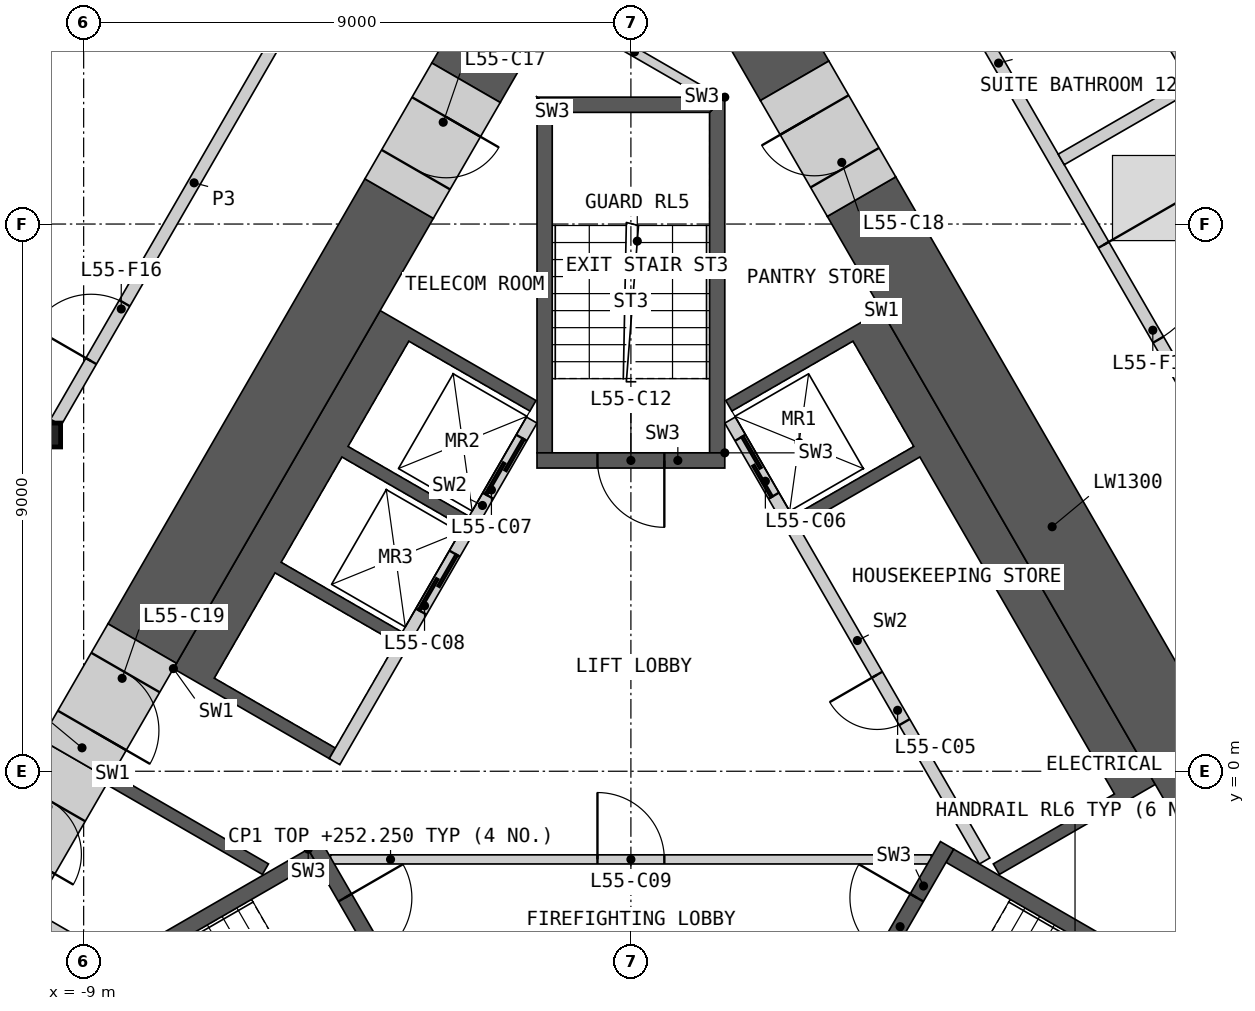
"""IFC4 building model, lengths in metres.
Left out: names, types, materials, properties, quantities, classifications, styles, units other than length and angle.
Written with IfcOpenShell. Run it as: python <this file> out.ifc"""

import sys

from ifc_helpers import new_model, si_unit, direction, frame, frame_2d, origin, origin_2d, place, context, subcontext, project, spatial, polyline, rectangle, i_section, outline, extrude, element, fill, save


model = new_model("IFC4")
c1 = context("Model", 3, precision=1e-05, world=origin(), true_north=direction((0.0, 1.0)))
c2 = subcontext(c1, "Body", "Model", "MODEL_VIEW")
j1 = project(units=[si_unit("LENGTHUNIT", "METRE"), si_unit("PLANEANGLEUNIT", "RADIAN")], contexts=[c1])
p1 = place(None, origin())
s1 = spatial("IfcSite", under=j1, at=p1, CompositionType="ELEMENT")
p2 = place(p1, origin())
s2 = spatial("IfcBuilding", under=s1, at=p2, CompositionType="ELEMENT")
p3 = place(p2, frame((0.0, 0.0, 249.0)))
s3 = spatial("IfcBuildingStorey", under=s2, at=p3, CompositionType="ELEMENT", Elevation=249.0)
p4 = place(p3, frame((-9.578, 5.53, 0.0), z_axis=(0.0, 0.0, 1.0), x_axis=(1.0, 0.0, 0.0)))
e1 = element("IfcColumn", 1, at=p4, inside=s3, PredefinedType="COLUMN", context=c2, shape_type="SweptSolid", body=[
    extrude(i_section(OverallWidth=0.399, OverallDepth=0.393, WebThickness=0.023, FlangeThickness=0.037, at=origin_2d()), origin(), (0.0, 0.0, 1.0), 3.6),
])
p5 = place(p3, origin())
e2 = element("IfcWall", 2, at=p5, inside=s3, PredefinedType="SHEAR", context=c2, shape_type="SweptSolid", body=[
    extrude(outline(polyline([(4.124, 7.577), (8.624, -0.217), (8.231, -0.444), (6.061, -1.697), (5.96, -1.524), (7.952, -0.374), (4.752, 5.169), (2.76, 4.019), (2.66, 4.192), (4.652, 5.342), (3.652, 7.074), (1.66, 5.924), (1.561, 6.097), (3.731, 7.35), (4.124, 7.577)])), origin(), (0.0, 0.0, 1.0), 3.25),
])
p6 = place(p3, frame((5.817, -1.476, 0.0), z_axis=(0.0, 0.0, 1.0), x_axis=(-0.500002616675, 0.866023893041, 0.0)))
e3 = element("IfcWall", 3, at=p6, inside=s3, PredefinedType="SOLIDWALL", context=c2, shape_type="SweptSolid", body=[
    extrude(rectangle(XDim=8.373, YDim=0.2, at=frame_2d((4.187, 0.0))), origin(), (0.0, 0.0, 1.0), 3.25),
])
p7 = place(p6, frame((2.637, 0.0, 0.0)))
e4 = element("IfcOpeningElement", 4, at=p7, cuts=e3, PredefinedType="OPENING", context=c2, shape_type="SweptSolid", body=[
    extrude(rectangle(XDim=0.9, YDim=2.1, at=frame_2d((0.45, 1.05))), frame((0.0, 0.11, 0.0), z_axis=(0.0, -1.0, 0.0), x_axis=(1.0, 0.0, 0.0)), (0.0, 0.0, 1.0), 0.22),
])
p8 = place(p6, frame((6.937, 0.0, 0.0)))
e5 = element("IfcOpeningElement", 5, at=p8, cuts=e3, PredefinedType="OPENING", context=c2, shape_type="SweptSolid", body=[
    extrude(rectangle(XDim=1.1, YDim=2.1, at=frame_2d((0.55, 1.05))), frame((0.0, 0.11, 0.0), z_axis=(0.0, -1.0, 0.0), x_axis=(1.0, 0.0, 0.0)), (0.0, 0.0, 1.0), 0.22),
])
p9 = place(p3, origin())
e6 = element("IfcWall", 6, at=p9, inside=s3, PredefinedType="SHEAR", context=c2, shape_type="SweptSolid", body=[
    extrude(outline(polyline([(-7.524, 1.688), (-4.124, 7.577), (-3.731, 7.35), (-1.561, 6.097), (-1.66, 5.924), (-3.652, 7.074), (-4.652, 5.342), (-2.66, 4.192), (-2.76, 4.019), (-4.752, 5.169), (-5.752, 3.437), (-3.76, 2.287), (-3.861, 2.113), (-5.852, 3.263), (-6.852, 1.531), (-4.861, 0.381), (-4.96, 0.208), (-7.131, 1.461), (-7.524, 1.688)])), origin(), (0.0, 0.0, 1.0), 3.25),
])
p10 = place(p3, origin())
e7 = element("IfcWall", 7, at=p10, inside=s3, PredefinedType="SHEAR", context=c2, shape_type="SweptSolid", body=[
    extrude(outline(polyline([(-8.524, -0.044), (-8.131, -0.271), (-5.96, -1.524), (-6.061, -1.697), (-8.231, -0.444), (-8.624, -0.217), (-8.524, -0.044)])), origin(), (0.0, 0.0, 1.0), 3.25),
])
p11 = place(p3, frame((-1.631, 5.776, 0.0), z_axis=(0.0, 0.0, 1.0), x_axis=(-0.499992876559, -0.866029516466, 0.0)))
e8 = element("IfcWall", 8, at=p11, inside=s3, PredefinedType="SOLIDWALL", context=c2, shape_type="SweptSolid", body=[
    extrude(rectangle(XDim=6.486, YDim=0.2, at=frame_2d((3.243, 0.0))), origin(), (0.0, 0.0, 1.0), 3.25),
])
p12 = place(p11, frame((0.337, 0.0, 0.0)))
e9 = element("IfcOpeningElement", 9, at=p12, cuts=e8, PredefinedType="OPENING", context=c2, shape_type="SweptSolid", body=[
    extrude(rectangle(XDim=1.1, YDim=2.1, at=frame_2d((0.55, 1.05))), frame((0.0, 0.11, 0.0), z_axis=(0.0, -1.0, 0.0), x_axis=(1.0, 0.0, 0.0)), (0.0, 0.0, 1.0), 0.22),
])
p13 = place(p11, frame((2.537, 0.0, 0.0)))
e10 = element("IfcOpeningElement", 10, at=p13, cuts=e8, PredefinedType="OPENING", context=c2, shape_type="SweptSolid", body=[
    extrude(rectangle(XDim=1.1, YDim=2.1, at=frame_2d((0.55, 1.05))), frame((0.0, 0.11, 0.0), z_axis=(0.0, -1.0, 0.0), x_axis=(1.0, 0.0, 0.0)), (0.0, 0.0, 1.0), 0.22),
])
p14 = place(p3, frame((-4.941, -1.45, 0.0), z_axis=(0.0, 0.0, 1.0), x_axis=(1.0, 0.0, 0.0)))
e11 = element("IfcWall", 11, at=p14, inside=s3, PredefinedType="PARTITIONING", context=c2, shape_type="SweptSolid", body=[
    extrude(rectangle(XDim=9.882, YDim=0.15, at=frame_2d((4.941, 0.0))), origin(), (0.0, 0.0, 1.0), 3.25),
])
p15 = place(p14, frame((4.391, 0.0, 0.0)))
e12 = element("IfcOpeningElement", 12, at=p15, cuts=e11, PredefinedType="OPENING", context=c2, shape_type="SweptSolid", body=[
    extrude(rectangle(XDim=1.1, YDim=2.1, at=frame_2d((0.55, 1.05))), frame((0.0, 0.085, 0.0), z_axis=(0.0, -1.0, 0.0), x_axis=(1.0, 0.0, 0.0)), (0.0, 0.0, 1.0), 0.17),
])
p16 = place(p3, origin())
e13 = element("IfcWall", 13, at=p16, inside=s3, PredefinedType="SHEAR", context=c2, shape_type="SweptSolid", body=[
    extrude(outline(polyline([(-5.307, -1.281), (-10.374, -4.206), (-10.032, -4.298), (-5.182, -1.498), (-5.307, -1.281)])), origin(), (0.0, 0.0, 1.0), 3.25),
])
p17 = place(p3, frame((-5.199, -1.219, 0.0), z_axis=(0.0, 0.0, 1.0), x_axis=(0.499982516597, -0.866035497597, 0.0)))
e14 = element("IfcWall", 14, at=p17, inside=s3, PredefinedType="SHEAR", context=c2, shape_type="SweptSolid", body=[
    extrude(rectangle(XDim=3.088, YDim=0.25, at=frame_2d((1.544, 0.0))), origin(), (0.0, 0.0, 1.0), 3.25),
])
p18 = place(p17, frame((0.994, 0.0, 0.0)))
e15 = element("IfcOpeningElement", 15, at=p18, cuts=e14, PredefinedType="OPENING", context=c2, shape_type="SweptSolid", body=[
    extrude(rectangle(XDim=1.1, YDim=2.1, at=frame_2d((0.55, 1.05))), frame((0.0, 0.135, 0.0), z_axis=(0.0, -1.0, 0.0), x_axis=(1.0, 0.0, 0.0)), (0.0, 0.0, 1.0), 0.27),
])
p19 = place(p3, origin())
e16 = element("IfcWall", 16, at=p19, inside=s3, PredefinedType="SHEAR", context=c2, shape_type="SweptSolid", body=[
    extrude(outline(polyline([(10.032, -4.298), (10.374, -4.206), (5.307, -1.281), (5.182, -1.498), (10.032, -4.298)])), origin(), (0.0, 0.0, 1.0), 3.25),
])
p20 = place(p3, frame((3.655, -3.893, 0.0), z_axis=(0.0, 0.0, 1.0), x_axis=(0.499982516597, 0.866035497597, 0.0)))
e17 = element("IfcWall", 17, at=p20, inside=s3, PredefinedType="SHEAR", context=c2, shape_type="SweptSolid", body=[
    extrude(rectangle(XDim=3.088, YDim=0.25, at=frame_2d((1.544, 0.0))), origin(), (0.0, 0.0, 1.0), 3.25),
])
p21 = place(p20, frame((0.994, 0.0, 0.0)))
e18 = element("IfcOpeningElement", 18, at=p21, cuts=e17, PredefinedType="OPENING", context=c2, shape_type="SweptSolid", body=[
    extrude(rectangle(XDim=1.1, YDim=2.1, at=frame_2d((0.55, 1.05))), frame((0.0, 0.135, 0.0), z_axis=(0.0, -1.0, 0.0), x_axis=(1.0, 0.0, 0.0)), (0.0, 0.0, 1.0), 0.27),
])
p22 = place(p3, origin())
e19 = element("IfcWall", 19, at=p22, inside=s3, PredefinedType="SHEAR", context=c2, shape_type="SweptSolid", body=[
    extrude(outline(polyline([(1.544, 5.237), (1.544, 11.087), (1.294, 10.837), (1.294, 5.237), (1.544, 5.237)])), origin(), (0.0, 0.0, 1.0), 3.25),
])
p23 = place(p3, origin())
e20 = element("IfcWall", 20, at=p23, inside=s3, PredefinedType="SHEAR", context=c2, shape_type="SweptSolid", body=[
    extrude(outline(polyline([(1.544, 11.087), (-1.544, 11.087), (-1.294, 10.837), (1.294, 10.837), (1.544, 11.087)])), origin(), (0.0, 0.0, 1.0), 3.25),
])
p24 = place(p3, origin())
e21 = element("IfcWall", 21, at=p24, inside=s3, PredefinedType="SHEAR", context=c2, shape_type="SweptSolid", body=[
    extrude(outline(polyline([(-1.294, 10.837), (-1.544, 11.087), (-1.544, 5.237), (-1.294, 5.237), (-1.294, 10.837)])), origin(), (0.0, 0.0, 1.0), 3.25),
])
p25 = place(p3, frame((1.544, 5.112, 0.0), z_axis=(0.0, 0.0, 1.0), x_axis=(-1.0, 0.0, 0.0)))
e22 = element("IfcWall", 22, at=p25, inside=s3, PredefinedType="SHEAR", context=c2, shape_type="SweptSolid", body=[
    extrude(rectangle(XDim=3.088, YDim=0.25, at=frame_2d((1.544, 0.0))), origin(), (0.0, 0.0, 1.0), 3.25),
])
p26 = place(p25, frame((0.994, 0.0, 0.0)))
e23 = element("IfcOpeningElement", 23, at=p26, cuts=e22, PredefinedType="OPENING", context=c2, shape_type="SweptSolid", body=[
    extrude(rectangle(XDim=1.1, YDim=2.1, at=frame_2d((0.55, 1.05))), frame((0.0, 0.135, 0.0), z_axis=(0.0, -1.0, 0.0), x_axis=(1.0, 0.0, 0.0)), (0.0, 0.0, 1.0), 0.27),
])
p27 = place(p3, frame((-1.237, 12.578, 0.0), z_axis=(0.0, 0.0, 1.0), x_axis=(0.866045649925, -0.499964931016, 0.0)))
e24 = element("IfcWall", 24, at=p27, inside=s3, PredefinedType="PARTITIONING", context=c2, shape_type="SweptSolid", body=[
    extrude(rectangle(XDim=2.992, YDim=0.15, at=frame_2d((1.496, 0.0))), origin(), (0.0, 0.0, 1.0), 3.25),
])
p28 = place(p3, frame((-9.862, -2.361, 0.0), z_axis=(0.0, 0.0, 1.0), x_axis=(0.865990094875, -0.500061151839, 0.0)))
e25 = element("IfcWall", 25, at=p28, inside=s3, PredefinedType="PARTITIONING", context=c2, shape_type="SweptSolid", body=[
    extrude(rectangle(XDim=1.56, YDim=0.15, at=frame_2d((0.78, 0.0))), origin(), (0.0, 0.0, 1.0), 3.25),
])
p29 = place(p3, frame((10.062, -1.408, 0.0), z_axis=(0.0, 0.0, 1.0), x_axis=(-0.500000545805, 0.866025088663, 0.0)))
e26 = element("IfcWall", 26, at=p29, inside=s3, PredefinedType="SHEAR", context=c2, shape_type="SweptSolid", body=[
    extrude(rectangle(XDim=12.539, YDim=1.3, at=frame_2d((6.27, 0.0))), origin(), (0.0, 0.0, 1.0), 3.25),
])
p30 = place(p3, frame((2.693, 11.356, 0.0), z_axis=(0.0, 0.0, 1.0), x_axis=(-0.50002837164, 0.866009022791, 0.0)))
e27 = element("IfcWall", 27, at=p30, inside=s3, PredefinedType="SHEAR", context=c2, shape_type="SweptSolid", body=[
    extrude(rectangle(XDim=4.26, YDim=1.3, at=frame_2d((2.13, 0.0))), origin(), (0.0, 0.0, 1.0), 3.25),
])
p31 = place(p3, frame((-3.812, 9.418, 0.0), z_axis=(0.0, 0.0, 1.0), x_axis=(-0.499995037753, -0.86602826872, 0.0)))
e28 = element("IfcWall", 28, at=p31, inside=s3, PredefinedType="SHEAR", context=c2, shape_type="SweptSolid", body=[
    extrude(rectangle(XDim=8.451, YDim=1.3, at=frame_2d((4.225, 0.0))), origin(), (0.0, 0.0, 1.0), 3.25),
])
p32 = place(p3, frame((-0.563, 15.045, 0.0), z_axis=(0.0, 0.0, 1.0), x_axis=(-0.499994567278, -0.866028540345, 0.0)))
e29 = element("IfcWall", 29, at=p32, inside=s3, PredefinedType="SHEAR", context=c2, shape_type="SweptSolid", body=[
    extrude(rectangle(XDim=4.297, YDim=1.3, at=frame_2d((2.149, 0.0))), origin(), (0.0, 0.0, 1.0), 3.25),
])
p33 = place(p3, frame((-9.137, 0.195, 0.0), z_axis=(0.0, 0.0, 1.0), x_axis=(-0.500009943768, -0.866019662671, 0.0)))
e30 = element("IfcWall", 30, at=p33, inside=s3, PredefinedType="SHEAR", context=c2, shape_type="SweptSolid", body=[
    extrude(rectangle(XDim=2.401, YDim=1.3, at=frame_2d((1.201, 0.0))), origin(), (0.0, 0.0, 1.0), 3.25),
])
p34 = place(p33, frame((0.8, 0.0, 0.0)))
e31 = element("IfcOpeningElement", 31, at=p34, cuts=e30, PredefinedType="OPENING", context=c2, shape_type="SweptSolid", body=[
    extrude(rectangle(XDim=1.0, YDim=2.1, at=frame_2d((0.5, 1.05))), frame((0.0, 0.66, 0.0), z_axis=(0.0, -1.0, 0.0), x_axis=(1.0, 0.0, 0.0)), (0.0, 0.0, 1.0), 1.32),
])
p35 = place(p3, frame((-2.712, 11.324, 0.0), z_axis=(0.0, 0.0, 1.0), x_axis=(-0.499946605688, -0.86605622881, 0.0)))
e32 = element("IfcWall", 32, at=p35, inside=s3, PredefinedType="SHEAR", context=c2, shape_type="SweptSolid", body=[
    extrude(rectangle(XDim=2.2, YDim=1.3, at=frame_2d((1.1, 0.0))), origin(), (0.0, 0.0, 1.0), 3.25),
])
p36 = place(p35, frame((0.65, 0.0, 0.0)))
e33 = element("IfcOpeningElement", 33, at=p36, cuts=e32, PredefinedType="OPENING", context=c2, shape_type="SweptSolid", body=[
    extrude(rectangle(XDim=1.0, YDim=2.1, at=frame_2d((0.5, 1.05))), frame((0.0, 0.66, 0.0), z_axis=(0.0, -1.0, 0.0), x_axis=(1.0, 0.0, 0.0)), (0.0, 0.0, 1.0), 1.32),
])
p37 = place(p3, frame((3.793, 9.451, 0.0), z_axis=(0.0, 0.0, 1.0), x_axis=(-0.499946605688, 0.86605622881, 0.0)))
e34 = element("IfcWall", 34, at=p37, inside=s3, PredefinedType="SHEAR", context=c2, shape_type="SweptSolid", body=[
    extrude(rectangle(XDim=2.2, YDim=1.3, at=frame_2d((1.1, 0.0))), origin(), (0.0, 0.0, 1.0), 3.25),
])
p38 = place(p37, frame((0.55, 0.0, 0.0)))
e35 = element("IfcOpeningElement", 35, at=p38, cuts=e34, PredefinedType="OPENING", context=c2, shape_type="SweptSolid", body=[
    extrude(rectangle(XDim=1.0, YDim=2.1, at=frame_2d((0.5, 1.05))), frame((0.0, 0.66, 0.0), z_axis=(0.0, -1.0, 0.0), x_axis=(1.0, 0.0, 0.0)), (0.0, 0.0, 1.0), 1.32),
])
p39 = place(p3, frame((-8.037, 2.1, 0.0), z_axis=(0.0, 0.0, 1.0), x_axis=(-0.50002983664, -0.866008176907, 0.0)))
e36 = element("IfcWall", 36, at=p39, inside=s3, PredefinedType="SHEAR", context=c2, shape_type="SweptSolid", body=[
    extrude(rectangle(XDim=2.2, YDim=1.3, at=frame_2d((1.1, 0.0))), origin(), (0.0, 0.0, 1.0), 3.25),
])
p40 = place(p39, frame((0.55, 0.0, 0.0)))
e37 = element("IfcOpeningElement", 37, at=p40, cuts=e36, PredefinedType="OPENING", context=c2, shape_type="SweptSolid", body=[
    extrude(rectangle(XDim=1.1, YDim=2.1, at=frame_2d((0.55, 1.05))), frame((0.0, 0.66, 0.0), z_axis=(0.0, -1.0, 0.0), x_axis=(1.0, 0.0, 0.0)), (0.0, 0.0, 1.0), 1.32),
])
p41 = place(p3, frame((4.91, 13.616, 0.0), z_axis=(0.0, 0.0, 1.0), x_axis=(0.50000207303, -0.866024206917, 0.0)))
e38 = element("IfcWall", 38, at=p41, inside=s3, PredefinedType="PARTITIONING", context=c2, shape_type="SweptSolid", body=[
    extrude(rectangle(XDim=9.095, YDim=0.2, at=frame_2d((4.547, 0.0))), origin(), (0.0, 0.0, 1.0), 3.25),
])
p42 = place(p41, frame((5.726, 0.0, 0.0)))
e39 = element("IfcOpeningElement", 39, at=p42, cuts=e38, PredefinedType="OPENING", context=c2, shape_type="SweptSolid", body=[
    extrude(rectangle(XDim=1.8, YDim=2.1, at=frame_2d((0.9, 1.05))), frame((0.0, 0.11, 0.0), z_axis=(0.0, -1.0, 0.0), x_axis=(1.0, 0.0, 0.0)), (0.0, 0.0, 1.0), 0.22),
])
p43 = place(p3, frame((-9.458, 5.74, 0.0), z_axis=(0.0, 0.0, 1.0), x_axis=(0.50000207303, 0.866024206917, 0.0)))
e40 = element("IfcWall", 40, at=p43, inside=s3, PredefinedType="PARTITIONING", context=c2, shape_type="SweptSolid", body=[
    extrude(rectangle(XDim=9.095, YDim=0.2, at=frame_2d((4.547, 0.0))), origin(), (0.0, 0.0, 1.0), 3.25),
])
p44 = place(p43, frame((1.162, 0.0, 0.0)))
e41 = element("IfcOpeningElement", 41, at=p44, cuts=e40, PredefinedType="OPENING", context=c2, shape_type="SweptSolid", body=[
    extrude(rectangle(XDim=1.1, YDim=2.1, at=frame_2d((0.55, 1.05))), frame((0.0, 0.11, 0.0), z_axis=(0.0, -1.0, 0.0), x_axis=(1.0, 0.0, 0.0)), (0.0, 0.0, 1.0), 0.22),
])
p45 = place(p3, frame((7.077, 10.062, 0.0), z_axis=(0.0, 0.0, 1.0), x_axis=(0.866041764179, 0.499971661894, 0.0)))
e42 = element("IfcWall", 42, at=p45, inside=s3, PredefinedType="PARTITIONING", context=c2, shape_type="SweptSolid", body=[
    extrude(rectangle(XDim=7.632, YDim=0.2, at=frame_2d((3.816, 0.0))), origin(), (0.0, 0.0, 1.0), 2.404),
])
p46 = place(p3, frame((7.717, 13.954, 0.0), z_axis=(0.0, 0.0, 1.0), x_axis=(0.500001826776, -0.866024349092, 0.0)))
e43 = element("IfcWall", 43, at=p46, inside=s3, PredefinedType="PARTITIONING", context=c2, shape_type="SweptSolid", body=[
    extrude(rectangle(XDim=2.95, YDim=0.1, at=frame_2d((1.475, 0.0))), origin(), (0.0, 0.0, 1.0), 2.404),
])
p47 = place(p46, frame((0.25, 0.0, 0.0)))
e44 = element("IfcOpeningElement", 44, at=p47, cuts=e43, PredefinedType="OPENING", context=c2, shape_type="SweptSolid", body=[
    extrude(rectangle(XDim=0.95, YDim=2.1, at=frame_2d((0.475, 1.05))), frame((0.0, 0.06, 0.0), z_axis=(0.0, -1.0, 0.0), x_axis=(1.0, 0.0, 0.0)), (0.0, 0.0, 1.0), 0.12),
])
p48 = place(p7, origin())
e45 = element("IfcDoor", 45, at=p48, inside=s3, OperationType="SINGLE_SWING_RIGHT", PredefinedType="DOOR", context=c2, shape_type="SweptSolid", body=[
    extrude(rectangle(XDim=0.9, YDim=2.1, at=frame_2d((0.45, 1.05))), frame((0.0, 0.025, 0.0), z_axis=(0.0, -1.0, 0.0), x_axis=(1.0, 0.0, 0.0)), (0.0, 0.0, 1.0), 0.05),
])
fill(e4, e45)
p49 = place(p8, origin())
e46 = element("IfcDoor", 46, at=p49, inside=s3, OperationType="SLIDING_TO_LEFT", PredefinedType="DOOR", context=c2, shape_type="SweptSolid", body=[
    extrude(rectangle(XDim=1.1, YDim=2.1, at=frame_2d((0.55, 1.05))), frame((0.0, 0.025, 0.0), z_axis=(0.0, -1.0, 0.0), x_axis=(1.0, 0.0, 0.0)), (0.0, 0.0, 1.0), 0.05),
])
fill(e5, e46)
p50 = place(p12, origin())
e47 = element("IfcDoor", 47, at=p50, inside=s3, OperationType="SLIDING_TO_LEFT", PredefinedType="DOOR", context=c2, shape_type="SweptSolid", body=[
    extrude(rectangle(XDim=1.1, YDim=2.1, at=frame_2d((0.55, 1.05))), frame((0.0, 0.025, 0.0), z_axis=(0.0, -1.0, 0.0), x_axis=(1.0, 0.0, 0.0)), (0.0, 0.0, 1.0), 0.05),
])
fill(e9, e47)
p51 = place(p13, origin())
e48 = element("IfcDoor", 48, at=p51, inside=s3, OperationType="SLIDING_TO_LEFT", PredefinedType="DOOR", context=c2, shape_type="SweptSolid", body=[
    extrude(rectangle(XDim=1.1, YDim=2.1, at=frame_2d((0.55, 1.05))), frame((0.0, 0.025, 0.0), z_axis=(0.0, -1.0, 0.0), x_axis=(1.0, 0.0, 0.0)), (0.0, 0.0, 1.0), 0.05),
])
fill(e10, e48)
p52 = place(p15, origin())
e49 = element("IfcDoor", 49, at=p52, inside=s3, OperationType="SINGLE_SWING_LEFT", PredefinedType="DOOR", context=c2, shape_type="SweptSolid", body=[
    extrude(rectangle(XDim=1.1, YDim=2.1, at=frame_2d((0.55, 1.05))), frame((0.0, 0.025, 0.0), z_axis=(0.0, -1.0, 0.0), x_axis=(1.0, 0.0, 0.0)), (0.0, 0.0, 1.0), 0.05),
])
fill(e12, e49)
p53 = place(p18, origin())
e50 = element("IfcDoor", 50, at=p53, inside=s3, OperationType="SINGLE_SWING_LEFT", PredefinedType="DOOR", context=c2, shape_type="SweptSolid", body=[
    extrude(rectangle(XDim=1.1, YDim=2.1, at=frame_2d((0.55, 1.05))), frame((0.0, 0.025, 0.0), z_axis=(0.0, -1.0, 0.0), x_axis=(1.0, 0.0, 0.0)), (0.0, 0.0, 1.0), 0.05),
])
fill(e15, e50)
p54 = place(p21, origin())
e51 = element("IfcDoor", 51, at=p54, inside=s3, OperationType="SINGLE_SWING_RIGHT", PredefinedType="DOOR", context=c2, shape_type="SweptSolid", body=[
    extrude(rectangle(XDim=1.1, YDim=2.1, at=frame_2d((0.55, 1.05))), frame((0.0, 0.025, 0.0), z_axis=(0.0, -1.0, 0.0), x_axis=(1.0, 0.0, 0.0)), (0.0, 0.0, 1.0), 0.05),
])
fill(e18, e51)
p55 = place(p26, origin())
e52 = element("IfcDoor", 52, at=p55, inside=s3, OperationType="SINGLE_SWING_LEFT", PredefinedType="DOOR", context=c2, shape_type="SweptSolid", body=[
    extrude(rectangle(XDim=1.1, YDim=2.1, at=frame_2d((0.55, 1.05))), frame((0.0, 0.025, 0.0), z_axis=(0.0, -1.0, 0.0), x_axis=(1.0, 0.0, 0.0)), (0.0, 0.0, 1.0), 0.05),
])
fill(e23, e52)
p56 = place(p34, origin())
e53 = element("IfcDoor", 53, at=p56, inside=s3, OperationType="SINGLE_SWING_RIGHT", PredefinedType="DOOR", context=c2, shape_type="SweptSolid", body=[
    extrude(rectangle(XDim=1.0, YDim=2.1, at=frame_2d((0.5, 1.05))), frame((0.0, 0.405, 0.0), z_axis=(0.0, -1.0, 0.0), x_axis=(1.0, 0.0, 0.0)), (0.0, 0.0, 1.0), 0.05),
])
fill(e31, e53)
p57 = place(p36, origin())
e54 = element("IfcDoor", 54, at=p57, inside=s3, OperationType="SINGLE_SWING_LEFT", PredefinedType="DOOR", context=c2, shape_type="SweptSolid", body=[
    extrude(rectangle(XDim=1.0, YDim=2.1, at=frame_2d((0.5, 1.05))), frame((0.0, 0.405, 0.0), z_axis=(0.0, -1.0, 0.0), x_axis=(1.0, 0.0, 0.0)), (0.0, 0.0, 1.0), 0.05),
])
fill(e33, e54)
p58 = place(p38, origin())
e55 = element("IfcDoor", 55, at=p58, inside=s3, OperationType="SINGLE_SWING_RIGHT", PredefinedType="DOOR", context=c2, shape_type="SweptSolid", body=[
    extrude(rectangle(XDim=1.0, YDim=2.1, at=frame_2d((0.5, 1.05))), frame((0.0, 0.405, 0.0), z_axis=(0.0, -1.0, 0.0), x_axis=(1.0, 0.0, 0.0)), (0.0, 0.0, 1.0), 0.05),
])
fill(e35, e55)
p59 = place(p40, origin())
e56 = element("IfcDoor", 56, at=p59, inside=s3, OperationType="SINGLE_SWING_RIGHT", PredefinedType="DOOR", context=c2, shape_type="SweptSolid", body=[
    extrude(rectangle(XDim=1.1, YDim=2.1, at=frame_2d((0.55, 1.05))), frame((0.0, 0.405, 0.0), z_axis=(0.0, -1.0, 0.0), x_axis=(1.0, 0.0, 0.0)), (0.0, 0.0, 1.0), 0.05),
])
fill(e37, e56)
p60 = place(p42, origin())
e57 = element("IfcDoor", 57, at=p60, inside=s3, OperationType="DOUBLE_DOOR_SINGLE_SWING", PredefinedType="DOOR", context=c2, shape_type="SweptSolid", body=[
    extrude(rectangle(XDim=1.8, YDim=2.1, at=frame_2d((0.9, 1.05))), frame((0.0, 0.025, 0.0), z_axis=(0.0, -1.0, 0.0), x_axis=(1.0, 0.0, 0.0)), (0.0, 0.0, 1.0), 0.05),
])
fill(e39, e57)
p61 = place(p44, origin())
e58 = element("IfcDoor", 58, at=p61, inside=s3, OperationType="SINGLE_SWING_LEFT", PredefinedType="DOOR", context=c2, shape_type="SweptSolid", body=[
    extrude(rectangle(XDim=1.1, YDim=2.1, at=frame_2d((0.55, 1.05))), frame((0.0, 0.025, 0.0), z_axis=(0.0, -1.0, 0.0), x_axis=(1.0, 0.0, 0.0)), (0.0, 0.0, 1.0), 0.05),
])
fill(e41, e58)
save(model, sys.argv[1])
